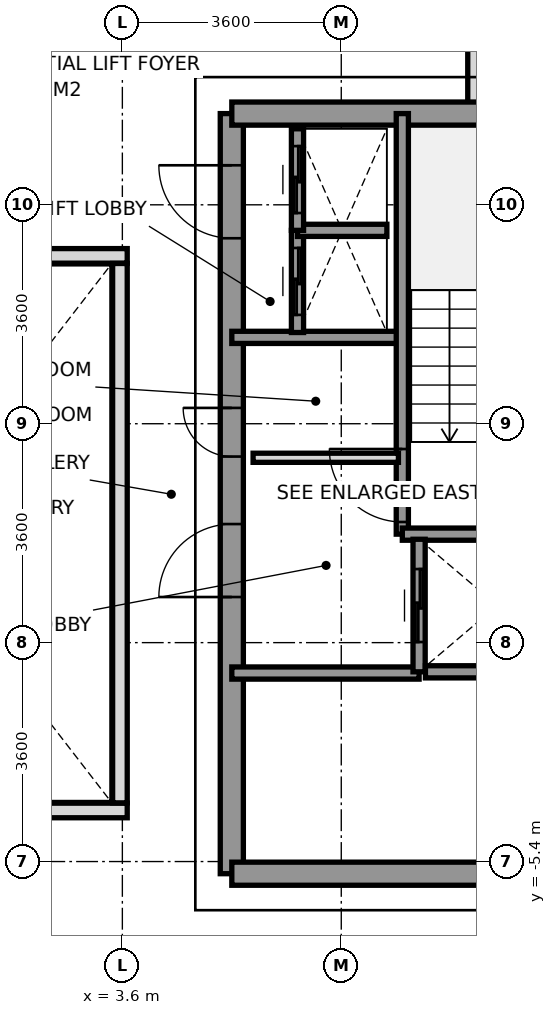
"""IFC4 building model, lengths in metres.
Left out: names, types, materials, properties, quantities, classifications, styles, units other than length and angle.
Written with IfcOpenShell. Run it as: python <this file> out.ifc"""

import sys

from ifc_helpers import new_model, si_unit, direction, frame, frame_2d, origin, place, context, subcontext, project, spatial, rectangle, extrude, source, transform, mapped, element, fill, save


model = new_model("IFC4")
c1 = context("Model", 3, precision=1e-05, world=origin(), true_north=direction((0.0, 1.0)))
c2 = subcontext(c1, "Body", "Model", "MODEL_VIEW")
j1 = project(units=[si_unit("LENGTHUNIT", "METRE"), si_unit("PLANEANGLEUNIT", "RADIAN")], contexts=[c1])
p1 = place(None, origin())
s1 = spatial("IfcSite", under=j1, at=p1, CompositionType="ELEMENT")
p2 = place(p1, origin())
s2 = spatial("IfcBuilding", under=s1, at=p2, CompositionType="ELEMENT")
p3 = place(p2, frame((0.0, 0.0, 208.0)))
s3 = spatial("IfcBuildingStorey", under=s2, at=p3, CompositionType="ELEMENT", Elevation=208.0)
p4 = place(p3, frame((9.4, 8.547, 0.0), z_axis=(0.0, 0.0, 1.0), x_axis=(0.0, -1.0, 0.0)))
e1 = element("IfcWall", 1, at=p4, inside=s3, PredefinedType="PARAPET", context=c2, shape_type="SweptSolid", body=[
    extrude(rectangle(XDim=1.594, YDim=0.24, at=frame_2d((0.797, 0.0))), origin(), (0.0, 0.0, 1.0), 1.15),
])
p5 = place(p3, frame((5.4, -5.6, 0.0), z_axis=(0.0, 0.0, 1.0), x_axis=(0.0, 1.0, 0.0)))
e2 = element("IfcWall", 2, at=p5, inside=s3, PredefinedType="SHEAR", context=c2, shape_type="SweptSolid", body=[
    extrude(rectangle(XDim=12.5, YDim=0.38, at=frame_2d((6.25, 0.0))), origin(), (0.0, 0.0, 1.0), 3.2),
])
p6 = place(p5, frame((4.55, 0.0, 0.0)))
e3 = element("IfcOpeningElement", 3, at=p6, cuts=e2, PredefinedType="OPENING", context=c2, shape_type="SweptSolid", body=[
    extrude(rectangle(XDim=1.2, YDim=2.2, at=frame_2d((0.6, 1.1))), frame((0.0, 0.2, 0.0), z_axis=(0.0, -1.0, 0.0), x_axis=(1.0, 0.0, 0.0)), (0.0, 0.0, 1.0), 0.4),
])
p7 = place(p5, frame((10.45, 0.0, 0.0)))
e4 = element("IfcOpeningElement", 4, at=p7, cuts=e2, PredefinedType="OPENING", context=c2, shape_type="SweptSolid", body=[
    extrude(rectangle(XDim=1.2, YDim=2.2, at=frame_2d((0.6, 1.1))), frame((0.0, 0.2, 0.0), z_axis=(0.0, -1.0, 0.0), x_axis=(1.0, 0.0, 0.0)), (0.0, 0.0, 1.0), 0.4),
])
p8 = place(p5, frame((6.86, 0.0, 0.0)))
e5 = element("IfcOpeningElement", 5, at=p8, cuts=e2, PredefinedType="OPENING", context=c2, shape_type="SweptSolid", body=[
    extrude(rectangle(XDim=0.8, YDim=2.1, at=frame_2d((0.4, 1.05))), frame((0.0, 0.2, 0.0), z_axis=(0.0, -1.0, 0.0), x_axis=(1.0, 0.0, 0.0)), (0.0, 0.0, 1.0), 0.4),
])
p9 = place(p3, frame((5.4, 6.9, 0.0), z_axis=(0.0, 0.0, 1.0), x_axis=(1.0, 0.0, 0.0)))
e6 = element("IfcWall", 6, at=p9, inside=s3, PredefinedType="SHEAR", context=c2, shape_type="SweptSolid", body=[
    extrude(rectangle(XDim=5.956, YDim=0.38, at=frame_2d((2.978, 0.0))), origin(), (0.0, 0.0, 1.0), 3.2),
])
p10 = place(p3, frame((5.4, -5.6, 0.0), z_axis=(0.0, 0.0, 1.0), x_axis=(1.0, 0.0, 0.0)))
e7 = element("IfcWall", 7, at=p10, inside=s3, PredefinedType="SHEAR", context=c2, shape_type="SweptSolid", body=[
    extrude(rectangle(XDim=7.8, YDim=0.38, at=frame_2d((3.9, 0.0))), origin(), (0.0, 0.0, 1.0), 3.2),
])
p11 = place(p3, frame((5.4, 3.22, 0.0), z_axis=(0.0, 0.0, 1.0), x_axis=(1.0, 0.0, 0.0)))
e8 = element("IfcWall", 8, at=p11, inside=s3, PredefinedType="SOLIDWALL", context=c2, shape_type="SweptSolid", body=[
    extrude(rectangle(XDim=2.78, YDim=0.2, at=frame_2d((1.39, 0.0))), origin(), (0.0, 0.0, 1.0), 3.2),
])
p12 = place(p3, frame((5.4, -2.3, 0.0), z_axis=(0.0, 0.0, 1.0), x_axis=(1.0, 0.0, 0.0)))
e9 = element("IfcWall", 9, at=p12, inside=s3, PredefinedType="SOLIDWALL", context=c2, shape_type="SweptSolid", body=[
    extrude(rectangle(XDim=3.08, YDim=0.2, at=frame_2d((1.54, 0.0))), origin(), (0.0, 0.0, 1.0), 3.2),
])
p13 = place(p3, frame((8.204, -0.016, 0.0), z_axis=(0.0, 0.0, 1.0), x_axis=(0.0, 1.0, 0.0)))
e10 = element("IfcWall", 10, at=p13, inside=s3, PredefinedType="SOLIDWALL", context=c2, shape_type="SweptSolid", body=[
    extrude(rectangle(XDim=6.916, YDim=0.2, at=frame_2d((3.458, 0.0))), origin(), (0.0, 0.0, 1.0), 3.2),
])
p14 = place(p13, frame((0.2, 0.0, 0.0)))
e11 = element("IfcOpeningElement", 11, at=p14, cuts=e10, PredefinedType="OPENING", context=c2, shape_type="SweptSolid", body=[
    extrude(rectangle(XDim=1.2, YDim=2.2, at=frame_2d((0.6, 1.1))), frame((0.0, 0.11, 0.0), z_axis=(0.0, -1.0, 0.0), x_axis=(1.0, 0.0, 0.0)), (0.0, 0.0, 1.0), 0.22),
])
p15 = place(p3, frame((8.204, -0.016, 0.0), z_axis=(0.0, 0.0, 1.0), x_axis=(1.0, 0.0, 0.0)))
e12 = element("IfcWall", 12, at=p15, inside=s3, PredefinedType="SOLIDWALL", context=c2, shape_type="SweptSolid", body=[
    extrude(rectangle(XDim=3.152, YDim=0.2, at=frame_2d((1.576, 0.0))), origin(), (0.0, 0.0, 1.0), 3.2),
])
p16 = place(p3, frame((8.48, -2.28, 0.0), z_axis=(0.0, 0.0, 1.0), x_axis=(0.0, 1.0, 0.0)))
e13 = element("IfcWall", 13, at=p16, inside=s3, PredefinedType="SOLIDWALL", context=c2, shape_type="SweptSolid", body=[
    extrude(rectangle(XDim=2.18, YDim=0.2, at=frame_2d((1.09, 0.0))), origin(), (0.0, 0.0, 1.0), 3.2),
])
p17 = place(p16, frame((0.49, 0.0, 0.0)))
e14 = element("IfcOpeningElement", 14, at=p17, cuts=e13, PredefinedType="OPENING", context=c2, shape_type="SweptSolid", body=[
    extrude(rectangle(XDim=1.2, YDim=2.2, at=frame_2d((0.6, 1.1))), frame((0.0, 0.11, 0.0), z_axis=(0.0, -1.0, 0.0), x_axis=(1.0, 0.0, 0.0)), (0.0, 0.0, 1.0), 0.22),
])
p18 = place(p3, frame((8.584, -2.28, 0.0), z_axis=(0.0, 0.0, 1.0), x_axis=(1.0, 0.0, 0.0)))
e15 = element("IfcWall", 15, at=p18, inside=s3, PredefinedType="SOLIDWALL", context=c2, shape_type="SweptSolid", body=[
    extrude(rectangle(XDim=2.362, YDim=0.2, at=frame_2d((1.181, 0.0))), origin(), (0.0, 0.0, 1.0), 3.2),
])
p19 = place(p3, frame((6.48, 3.3, 0.0), z_axis=(0.0, 0.0, 1.0), x_axis=(0.0, 1.0, 0.0)))
e16 = element("IfcWall", 16, at=p19, inside=s3, PredefinedType="SOLIDWALL", context=c2, shape_type="SweptSolid", body=[
    extrude(rectangle(XDim=1.68, YDim=0.2, at=frame_2d((0.84, 0.0))), origin(), (0.0, 0.0, 1.0), 3.2),
])
p20 = place(p19, frame((0.29, 0.0, 0.0)))
e17 = element("IfcOpeningElement", 17, at=p20, cuts=e16, PredefinedType="OPENING", context=c2, shape_type="SweptSolid", body=[
    extrude(rectangle(XDim=1.1, YDim=2.2, at=frame_2d((0.55, 1.1))), frame((0.0, 0.11, 0.0), z_axis=(0.0, -1.0, 0.0), x_axis=(1.0, 0.0, 0.0)), (0.0, 0.0, 1.0), 0.22),
])
p21 = place(p3, frame((6.48, 4.98, 0.0), z_axis=(0.0, 0.0, 1.0), x_axis=(1.0, 0.0, 0.0)))
e18 = element("IfcWall", 18, at=p21, inside=s3, PredefinedType="SOLIDWALL", context=c2, shape_type="SweptSolid", body=[
    extrude(rectangle(XDim=1.47, YDim=0.2, at=frame_2d((0.735, 0.0))), origin(), (0.0, 0.0, 1.0), 3.2),
])
p22 = place(p3, frame((6.48, 4.98, 0.0), z_axis=(0.0, 0.0, 1.0), x_axis=(0.0, 1.0, 0.0)))
e19 = element("IfcWall", 19, at=p22, inside=s3, PredefinedType="SOLIDWALL", context=c2, shape_type="SweptSolid", body=[
    extrude(rectangle(XDim=1.67, YDim=0.2, at=frame_2d((0.835, 0.0))), origin(), (0.0, 0.0, 1.0), 3.2),
])
p23 = place(p22, frame((0.285, 0.0, 0.0)))
e20 = element("IfcOpeningElement", 20, at=p23, cuts=e19, PredefinedType="OPENING", context=c2, shape_type="SweptSolid", body=[
    extrude(rectangle(XDim=1.1, YDim=2.2, at=frame_2d((0.55, 1.1))), frame((0.0, 0.11, 0.0), z_axis=(0.0, -1.0, 0.0), x_axis=(1.0, 0.0, 0.0)), (0.0, 0.0, 1.0), 0.22),
])
p24 = place(p3, frame((5.75, 1.24, 0.0), z_axis=(0.0, 0.0, 1.0), x_axis=(1.0, 0.0, 0.0)))
e21 = element("IfcWall", 21, at=p24, inside=s3, PredefinedType="PARTITIONING", context=c2, shape_type="SweptSolid", body=[
    extrude(rectangle(XDim=2.39, YDim=0.15, at=frame_2d((1.195, 0.0))), origin(), (0.0, 0.0, 1.0), 2.3),
])
for number, where, z_axis, x_axis in (
    (22, (-3.68, -4.56, 0.0), (0.0, 0.0, 1.0), (1.0, 0.0, 0.0)),
    (23, (-3.68, 4.56, 0.0), (0.0, 0.0, 1.0), (1.0, 0.0, 0.0)),
):
    element("IfcWall", number, at=place(p3, frame(where, z_axis=z_axis, x_axis=x_axis)), inside=s3, PredefinedType="PARAPET", context=c2, shape_type="SweptSolid", body=[
        extrude(rectangle(XDim=7.36, YDim=0.24, at=frame_2d((3.68, 0.0))), origin(), (0.0, 0.0, 1.0), 1.15),
    ])
p25 = place(p3, frame((3.56, -4.435, 0.0), z_axis=(0.0, 0.0, 1.0), x_axis=(0.0, 1.0, 0.0)))
e24 = element("IfcWall", 24, at=p25, inside=s3, PredefinedType="PARAPET", context=c2, shape_type="SweptSolid", body=[
    extrude(rectangle(XDim=8.87, YDim=0.24, at=frame_2d((4.435, 0.0))), origin(), (0.0, 0.0, 1.0), 1.15),
])
m1 = source(origin(), c2, "Body", "SweptSolid", [
    extrude(rectangle(XDim=1.2, YDim=2.2, at=frame_2d((0.6, 1.1))), frame((0.0, 0.025, 0.0), z_axis=(0.0, -1.0, 0.0), x_axis=(1.0, 0.0, 0.0)), (0.0, 0.0, 1.0), 0.05),
])
p26 = place(p14, origin())
e25 = element("IfcDoor", 25, at=p26, inside=s3, OperationType="SINGLE_SWING_RIGHT", PredefinedType="DOOR", context=c2, shape_type="MappedRepresentation", body=[
    mapped(m1, transform((0.0, 0.0, 0.0), x_axis=(1.0, 0.0, 0.0), y_axis=(0.0, 1.0, 0.0), z_axis=(0.0, 0.0, 1.0), scale=1.0)),
])
fill(e11, e25)
p27 = place(p6, origin())
e26 = element("IfcDoor", 26, at=p27, inside=s3, OperationType="SINGLE_SWING_LEFT", PredefinedType="DOOR", context=c2, shape_type="MappedRepresentation", body=[
    mapped(m1, transform((0.0, 0.0, 0.0), x_axis=(1.0, 0.0, 0.0), y_axis=(0.0, 1.0, 0.0), z_axis=(0.0, 0.0, 1.0), scale=1.0)),
])
fill(e3, e26)
p28 = place(p7, origin())
e27 = element("IfcDoor", 27, at=p28, inside=s3, OperationType="SINGLE_SWING_RIGHT", PredefinedType="DOOR", context=c2, shape_type="MappedRepresentation", body=[
    mapped(m1, transform((0.0, 0.0, 0.0), x_axis=(1.0, 0.0, 0.0), y_axis=(0.0, 1.0, 0.0), z_axis=(0.0, 0.0, 1.0), scale=1.0)),
])
fill(e4, e27)
m2 = source(origin(), c2, "Body", "SweptSolid", [
    extrude(rectangle(XDim=0.8, YDim=2.1, at=frame_2d((0.4, 1.05))), frame((0.0, 0.025, 0.0), z_axis=(0.0, -1.0, 0.0), x_axis=(1.0, 0.0, 0.0)), (0.0, 0.0, 1.0), 0.05),
])
p29 = place(p8, origin())
e28 = element("IfcDoor", 28, at=p29, inside=s3, OperationType="SINGLE_SWING_RIGHT", PredefinedType="DOOR", context=c2, shape_type="MappedRepresentation", body=[
    mapped(m2, transform((0.0, 0.0, 0.0), x_axis=(1.0, 0.0, 0.0), y_axis=(0.0, 1.0, 0.0), z_axis=(0.0, 0.0, 1.0), scale=1.0)),
])
fill(e5, e28)
p30 = place(p17, origin())
e29 = element("IfcDoor", 29, at=p30, inside=s3, OperationType="SLIDING_TO_RIGHT", PredefinedType="DOOR", context=c2, shape_type="MappedRepresentation", body=[
    mapped(m1, transform((0.0, 0.0, 0.0), x_axis=(1.0, 0.0, 0.0), y_axis=(0.0, 1.0, 0.0), z_axis=(0.0, 0.0, 1.0), scale=1.0)),
])
fill(e14, e29)
m3 = source(origin(), c2, "Body", "SweptSolid", [
    extrude(rectangle(XDim=1.1, YDim=2.2, at=frame_2d((0.55, 1.1))), frame((0.0, 0.025, 0.0), z_axis=(0.0, -1.0, 0.0), x_axis=(1.0, 0.0, 0.0)), (0.0, 0.0, 1.0), 0.05),
])
p31 = place(p20, origin())
e30 = element("IfcDoor", 30, at=p31, inside=s3, OperationType="SLIDING_TO_LEFT", PredefinedType="DOOR", context=c2, shape_type="MappedRepresentation", body=[
    mapped(m3, transform((0.0, 0.0, 0.0), x_axis=(1.0, 0.0, 0.0), y_axis=(0.0, 1.0, 0.0), z_axis=(0.0, 0.0, 1.0), scale=1.0)),
])
fill(e17, e30)
p32 = place(p23, origin())
e31 = element("IfcDoor", 31, at=p32, inside=s3, OperationType="SLIDING_TO_LEFT", PredefinedType="DOOR", context=c2, shape_type="MappedRepresentation", body=[
    mapped(m3, transform((0.0, 0.0, 0.0), x_axis=(1.0, 0.0, 0.0), y_axis=(0.0, 1.0, 0.0), z_axis=(0.0, 0.0, 1.0), scale=1.0)),
])
fill(e20, e31)
save(model, sys.argv[1])
